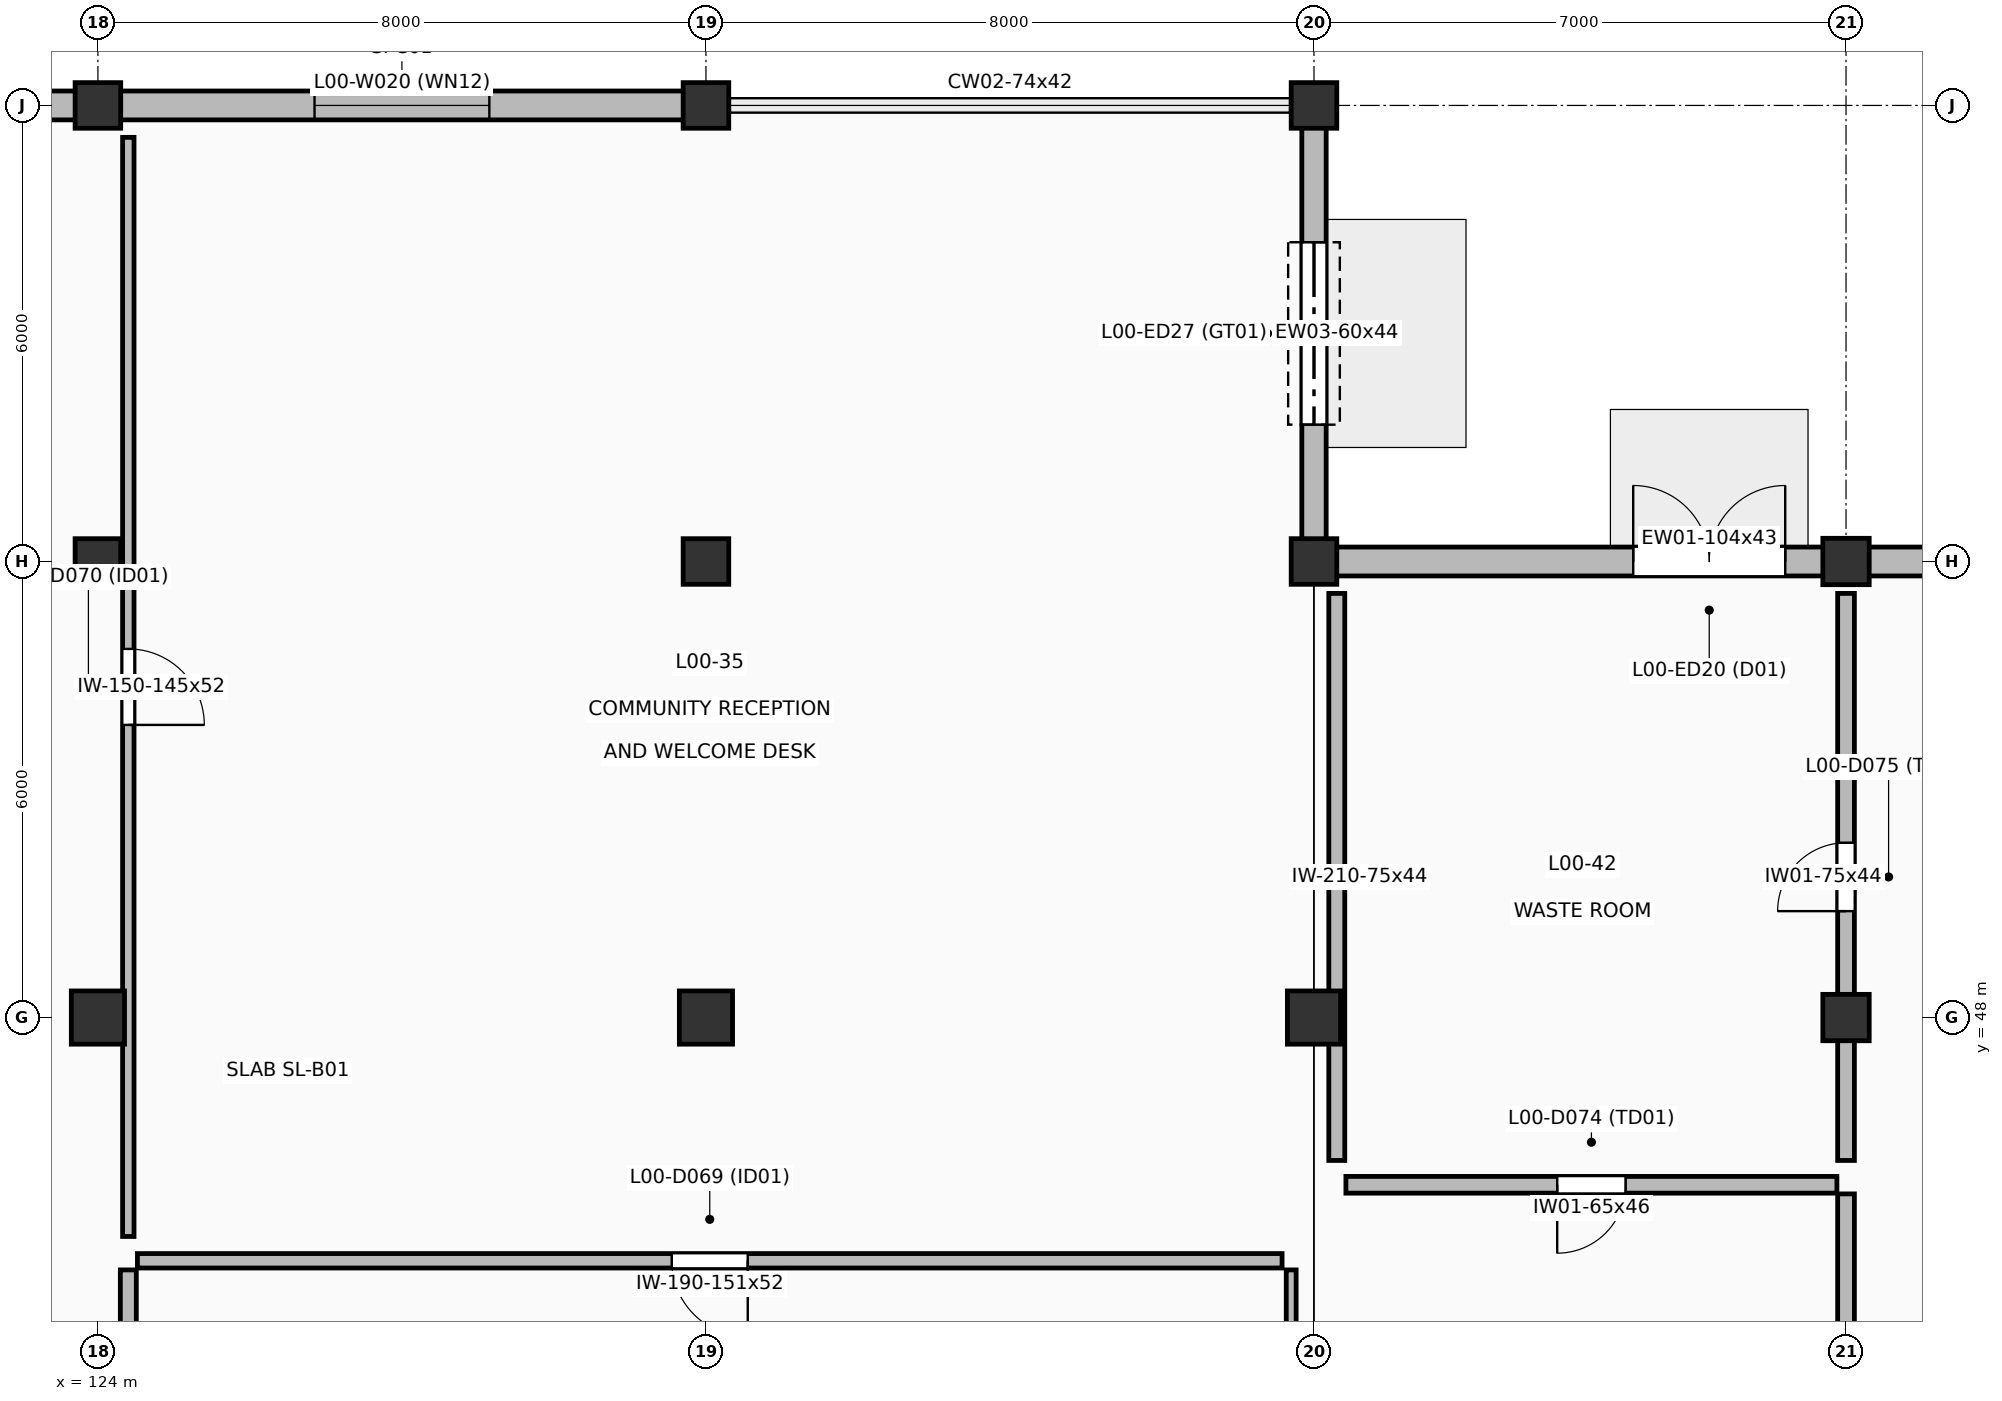
"""IFC4 building model, lengths in metres.
Left out: names, types, materials, properties, quantities, classifications, styles, units other than length and angle.
Written with IfcOpenShell. Run it as: python <this file> out.ifc"""

import sys

from ifc_helpers import new_model, si_unit, direction, frame, frame_2d, origin, origin_2d, place, context, subcontext, project, spatial, rectangle, extrude, element, fill, save


model = new_model("IFC4")
c1 = context("Model", 3, precision=1e-05, world=origin(), true_north=direction((0.0, 1.0)))
c2 = subcontext(c1, "Body", "Model", "MODEL_VIEW")
j1 = project(units=[si_unit("LENGTHUNIT", "METRE"), si_unit("PLANEANGLEUNIT", "RADIAN")], contexts=[c1])
p1 = place(None, origin())
s1 = spatial("IfcSite", under=j1, at=p1, CompositionType="ELEMENT")
p2 = place(p1, origin())
s2 = spatial("IfcBuilding", under=s1, at=p2, CompositionType="ELEMENT")
p3 = place(p2, origin())
s3 = spatial("IfcBuildingStorey", under=s2, at=p3, CompositionType="ELEMENT", Elevation=0.0)
p4 = place(p3, frame((124.0, 48.0, 0.0), z_axis=(0.0, 0.0, 1.0), x_axis=(1.0, 0.0, 0.0)))
e1 = element("IfcColumn", 1, at=p4, inside=s3, PredefinedType="COLUMN", context=c2, shape_type="SweptSolid", body=[
    extrude(rectangle(XDim=0.7, YDim=0.7, at=origin_2d()), origin(), (0.0, 0.0, 1.0), 5.4),
])
for number, where, z_axis, x_axis in (
    (2, (124.0, 54.0, 0.0), (0.0, 0.0, 1.0), (1.0, 0.0, 0.0)),
    (3, (124.0, 60.0, 0.0), (0.0, 0.0, 1.0), (1.0, 0.0, 0.0)),
):
    element("IfcColumn", number, at=place(p3, frame(where, z_axis=z_axis, x_axis=x_axis)), inside=s3, PredefinedType="COLUMN", context=c2, shape_type="SweptSolid", body=[
        extrude(rectangle(XDim=0.6, YDim=0.6, at=origin_2d()), origin(), (0.0, 0.0, 1.0), 5.4),
    ])
p5 = place(p3, frame((132.0, 48.0, 0.0), z_axis=(0.0, 0.0, 1.0), x_axis=(1.0, 0.0, 0.0)))
e4 = element("IfcColumn", 4, at=p5, inside=s3, PredefinedType="COLUMN", context=c2, shape_type="SweptSolid", body=[
    extrude(rectangle(XDim=0.7, YDim=0.7, at=origin_2d()), origin(), (0.0, 0.0, 1.0), 5.4),
])
for number, where, z_axis, x_axis in (
    (5, (132.0, 54.0, 0.0), (0.0, 0.0, 1.0), (1.0, 0.0, 0.0)),
    (6, (132.0, 60.0, 0.0), (0.0, 0.0, 1.0), (1.0, 0.0, 0.0)),
):
    element("IfcColumn", number, at=place(p3, frame(where, z_axis=z_axis, x_axis=x_axis)), inside=s3, PredefinedType="COLUMN", context=c2, shape_type="SweptSolid", body=[
        extrude(rectangle(XDim=0.6, YDim=0.6, at=origin_2d()), origin(), (0.0, 0.0, 1.0), 5.4),
    ])
p6 = place(p3, frame((140.0, 48.0, 0.0), z_axis=(0.0, 0.0, 1.0), x_axis=(1.0, 0.0, 0.0)))
e7 = element("IfcColumn", 7, at=p6, inside=s3, PredefinedType="COLUMN", context=c2, shape_type="SweptSolid", body=[
    extrude(rectangle(XDim=0.7, YDim=0.7, at=origin_2d()), origin(), (0.0, 0.0, 1.0), 5.4),
])
for number, where, z_axis, x_axis in (
    (8, (140.0, 54.0, 0.0), (0.0, 0.0, 1.0), (1.0, 0.0, 0.0)),
    (9, (140.0, 60.0, 0.0), (0.0, 0.0, 1.0), (1.0, 0.0, 0.0)),
):
    element("IfcColumn", number, at=place(p3, frame(where, z_axis=z_axis, x_axis=x_axis)), inside=s3, PredefinedType="COLUMN", context=c2, shape_type="SweptSolid", body=[
        extrude(rectangle(XDim=0.6, YDim=0.6, at=origin_2d()), origin(), (0.0, 0.0, 1.0), 5.4),
    ])
for number, where, z_axis, x_axis in (
    (10, (147.0, 48.0, 0.0), (0.0, 0.0, 1.0), (1.0, 0.0, 0.0)),
    (11, (147.0, 54.0, 0.0), (0.0, 0.0, 1.0), (1.0, 0.0, 0.0)),
):
    element("IfcColumn", number, at=place(p3, frame(where, z_axis=z_axis, x_axis=x_axis)), inside=s3, PredefinedType="COLUMN", context=c2, shape_type="SweptSolid", body=[
        extrude(rectangle(XDim=0.61, YDim=0.61, at=origin_2d()), origin(), (0.0, 0.0, 1.0), 5.4),
    ])
p7 = place(p3, frame((116.0, 60.0, 0.0), z_axis=(0.0, 0.0, 1.0), x_axis=(1.0, 0.0, 0.0)))
e12 = element("IfcWall", 12, at=p7, inside=s3, PredefinedType="SOLIDWALL", context=c2, shape_type="SweptSolid", body=[
    extrude(rectangle(XDim=8.0, YDim=0.38, at=frame_2d((4.0, 0.0))), origin(), (0.0, 0.0, 1.0), 4.245),
])
p8 = place(p7, frame((2.9, 0.0, 0.0)))
e13 = element("IfcOpeningElement", 13, at=p8, cuts=e12, PredefinedType="OPENING", context=c2, shape_type="SweptSolid", body=[
    extrude(rectangle(XDim=2.2, YDim=2.45, at=frame_2d((1.1, 1.225))), frame((0.0, 0.2, 0.0), z_axis=(0.0, -1.0, 0.0), x_axis=(1.0, 0.0, 0.0)), (0.0, 0.0, 1.0), 0.4),
])
p9 = place(p3, frame((124.0, 60.0, 0.0), z_axis=(0.0, 0.0, 1.0), x_axis=(1.0, 0.0, 0.0)))
e14 = element("IfcWall", 14, at=p9, inside=s3, PredefinedType="SOLIDWALL", context=c2, shape_type="SweptSolid", body=[
    extrude(rectangle(XDim=8.0, YDim=0.38, at=frame_2d((4.0, 0.0))), origin(), (0.0, 0.0, 1.0), 4.245),
])
p10 = place(p9, frame((2.85, 0.0, 0.9)))
e15 = element("IfcOpeningElement", 15, at=p10, cuts=e14, PredefinedType="OPENING", context=c2, shape_type="SweptSolid", body=[
    extrude(rectangle(XDim=2.3, YDim=2.6, at=frame_2d((1.15, 1.3))), frame((0.0, 0.2, 0.0), z_axis=(0.0, -1.0, 0.0), x_axis=(1.0, 0.0, 0.0)), (0.0, 0.0, 1.0), 0.4),
])
p11 = place(p3, frame((140.0, 54.0, 0.0), z_axis=(0.0, 0.0, 1.0), x_axis=(1.0, 0.0, 0.0)))
e16 = element("IfcWall", 16, at=p11, inside=s3, PredefinedType="SOLIDWALL", context=c2, shape_type="SweptSolid", body=[
    extrude(rectangle(XDim=10.4, YDim=0.38, at=frame_2d((5.2, 0.0))), origin(), (0.0, 0.0, 1.0), 4.315),
])
p12 = place(p11, frame((4.2, 0.0, 0.0)))
e17 = element("IfcOpeningElement", 17, at=p12, cuts=e16, PredefinedType="OPENING", context=c2, shape_type="SweptSolid", body=[
    extrude(rectangle(XDim=2.0, YDim=2.4, at=frame_2d((1.0, 1.2))), frame((0.0, 0.2, 0.0), z_axis=(0.0, -1.0, 0.0), x_axis=(1.0, 0.0, 0.0)), (0.0, 0.0, 1.0), 0.4),
])
p13 = place(p3, frame((140.0, 60.0, 0.0), z_axis=(0.0, 0.0, 1.0), x_axis=(0.0, -1.0, 0.0)))
e18 = element("IfcWall", 18, at=p13, inside=s3, PredefinedType="SOLIDWALL", context=c2, shape_type="SweptSolid", body=[
    extrude(rectangle(XDim=6.0, YDim=0.32, at=frame_2d((3.0, 0.0))), origin(), (0.0, 0.0, 1.0), 4.425),
])
p14 = place(p13, frame((1.8, 0.0, 0.0)))
e19 = element("IfcOpeningElement", 19, at=p14, cuts=e18, PredefinedType="OPENING", context=c2, shape_type="SweptSolid", body=[
    extrude(rectangle(XDim=2.4, YDim=2.4, at=frame_2d((1.2, 1.2))), frame((0.0, 0.17, 0.0), z_axis=(0.0, -1.0, 0.0), x_axis=(1.0, 0.0, 0.0)), (0.0, 0.0, 1.0), 0.34),
])
p15 = place(p3, frame((139.58, 44.8, 0.0), z_axis=(0.0, 0.0, 1.0), x_axis=(-1.0, 0.0, 0.0)))
e20 = element("IfcWall", 20, at=p15, inside=s3, PredefinedType="PARTITIONING", context=c2, shape_type="SweptSolid", body=[
    extrude(rectangle(XDim=15.06, YDim=0.19, at=frame_2d((7.53, 0.0))), origin(), (0.0, 0.0, 1.0), 5.16),
])
p16 = place(p15, frame((7.03, 0.0, 0.0)))
e21 = element("IfcOpeningElement", 21, at=p16, cuts=e20, PredefinedType="OPENING", context=c2, shape_type="SweptSolid", body=[
    extrude(rectangle(XDim=1.0, YDim=2.15, at=frame_2d((0.5, 1.075))), frame((0.0, 0.105, 0.0), z_axis=(0.0, -1.0, 0.0), x_axis=(1.0, 0.0, 0.0)), (0.0, 0.0, 1.0), 0.21),
])
p17 = place(p3, frame((124.4, 44.68, 0.0), z_axis=(0.0, 0.0, 1.0), x_axis=(0.0, -1.0, 0.0)))
e22 = element("IfcWall", 22, at=p17, inside=s3, PredefinedType="PARTITIONING", context=c2, shape_type="SweptSolid", body=[
    extrude(rectangle(XDim=14.26, YDim=0.21, at=frame_2d((7.13, 0.0))), origin(), (0.0, 0.0, 1.0), 5.16),
])
p18 = place(p3, frame((139.7, 30.42, 0.0), z_axis=(0.0, 0.0, 1.0), x_axis=(0.0, 1.0, 0.0)))
e23 = element("IfcWall", 23, at=p18, inside=s3, PredefinedType="PARTITIONING", context=c2, shape_type="SweptSolid", body=[
    extrude(rectangle(XDim=14.26, YDim=0.13, at=frame_2d((7.13, 0.0))), origin(), (0.0, 0.0, 1.0), 4.425),
])
p19 = place(p3, frame((124.4, 59.58, 0.0), z_axis=(0.0, 0.0, 1.0), x_axis=(0.0, -1.0, 0.0)))
e24 = element("IfcWall", 24, at=p19, inside=s3, PredefinedType="PARTITIONING", context=c2, shape_type="SweptSolid", body=[
    extrude(rectangle(XDim=14.46, YDim=0.15, at=frame_2d((7.23, 0.0))), origin(), (0.0, 0.0, 1.0), 5.16),
])
p20 = place(p19, frame((6.73, 0.0, 0.0)))
e25 = element("IfcOpeningElement", 25, at=p20, cuts=e24, PredefinedType="OPENING", context=c2, shape_type="SweptSolid", body=[
    extrude(rectangle(XDim=1.0, YDim=2.15, at=frame_2d((0.5, 1.075))), frame((0.0, 0.085, 0.0), z_axis=(0.0, -1.0, 0.0), x_axis=(1.0, 0.0, 0.0)), (0.0, 0.0, 1.0), 0.17),
])
p21 = place(p3, frame((146.88, 45.8, 0.0), z_axis=(0.0, 0.0, 1.0), x_axis=(-1.0, 0.0, 0.0)))
e26 = element("IfcWall", 26, at=p21, inside=s3, PredefinedType="SOLIDWALL", context=c2, shape_type="SweptSolid", body=[
    extrude(rectangle(XDim=6.46, YDim=0.22, at=frame_2d((3.23, 0.0))), origin(), (0.0, 0.0, 1.0), 4.585),
])
p22 = place(p21, frame((2.78, 0.0, 0.0)))
e27 = element("IfcOpeningElement", 27, at=p22, cuts=e26, PredefinedType="OPENING", context=c2, shape_type="SweptSolid", body=[
    extrude(rectangle(XDim=0.9, YDim=2.1, at=frame_2d((0.45, 1.05))), frame((0.0, 0.12, 0.0), z_axis=(0.0, -1.0, 0.0), x_axis=(1.0, 0.0, 0.0)), (0.0, 0.0, 1.0), 0.24),
])
p23 = place(p3, frame((147.0, 36.32, 0.0), z_axis=(0.0, 0.0, 1.0), x_axis=(0.0, 1.0, 0.0)))
e28 = element("IfcWall", 28, at=p23, inside=s3, PredefinedType="SOLIDWALL", context=c2, shape_type="SweptSolid", body=[
    extrude(rectangle(XDim=9.36, YDim=0.22, at=frame_2d((4.68, 0.0))), origin(), (0.0, 0.0, 1.0), 4.425),
])
p24 = place(p3, frame((147.0, 46.12, 0.0), z_axis=(0.0, 0.0, 1.0), x_axis=(0.0, 1.0, 0.0)))
e29 = element("IfcWall", 29, at=p24, inside=s3, PredefinedType="SOLIDWALL", context=c2, shape_type="SweptSolid", body=[
    extrude(rectangle(XDim=7.46, YDim=0.22, at=frame_2d((3.73, 0.0))), origin(), (0.0, 0.0, 1.0), 4.425),
])
p25 = place(p24, frame((3.28, 0.0, 0.0)))
e30 = element("IfcOpeningElement", 30, at=p25, cuts=e29, PredefinedType="OPENING", context=c2, shape_type="SweptSolid", body=[
    extrude(rectangle(XDim=0.9, YDim=2.1, at=frame_2d((0.45, 1.05))), frame((0.0, 0.12, 0.0), z_axis=(0.0, -1.0, 0.0), x_axis=(1.0, 0.0, 0.0)), (0.0, 0.0, 1.0), 0.24),
])
p26 = place(p3, frame((140.3, 53.58, 0.0), z_axis=(0.0, 0.0, 1.0), x_axis=(0.0, -1.0, 0.0)))
e31 = element("IfcWall", 31, at=p26, inside=s3, PredefinedType="PARTITIONING", context=c2, shape_type="SweptSolid", body=[
    extrude(rectangle(XDim=7.46, YDim=0.21, at=frame_2d((3.73, 0.0))), origin(), (0.0, 0.0, 1.0), 4.425),
])
p27 = place(p10, origin())
e32 = element("IfcWindow", 32, at=p27, inside=s3, PartitioningType="DOUBLE_PANEL_VERTICAL", PredefinedType="WINDOW", context=c2, shape_type="SweptSolid", body=[
    extrude(rectangle(XDim=2.3, YDim=2.6, at=frame_2d((1.15, 1.3))), frame((0.0, 0.03, 0.0), z_axis=(0.0, -1.0, 0.0), x_axis=(1.0, 0.0, 0.0)), (0.0, 0.0, 1.0), 0.06),
])
fill(e15, e32)
p28 = place(p12, origin())
e33 = element("IfcDoor", 33, at=p28, inside=s3, OperationType="DOUBLE_DOOR_SINGLE_SWING", PredefinedType="DOOR", context=c2, shape_type="SweptSolid", body=[
    extrude(rectangle(XDim=2.0, YDim=2.4, at=frame_2d((1.0, 1.2))), frame((0.0, 0.025, 0.0), z_axis=(0.0, -1.0, 0.0), x_axis=(1.0, 0.0, 0.0)), (0.0, 0.0, 1.0), 0.05),
])
fill(e17, e33)
p29 = place(p14, origin())
e34 = element("IfcDoor", 34, at=p29, inside=s3, OperationType="DOUBLE_DOOR_SINGLE_SWING", PredefinedType="GATE", context=c2, shape_type="SweptSolid", body=[
    extrude(rectangle(XDim=2.4, YDim=2.4, at=frame_2d((1.2, 1.2))), frame((0.0, 0.025, 0.0), z_axis=(0.0, -1.0, 0.0), x_axis=(1.0, 0.0, 0.0)), (0.0, 0.0, 1.0), 0.05),
])
fill(e19, e34)
p30 = place(p16, origin())
e35 = element("IfcDoor", 35, at=p30, inside=s3, OperationType="SINGLE_SWING_LEFT", PredefinedType="DOOR", context=c2, shape_type="SweptSolid", body=[
    extrude(rectangle(XDim=1.0, YDim=2.15, at=frame_2d((0.5, 1.075))), frame((0.0, 0.025, 0.0), z_axis=(0.0, -1.0, 0.0), x_axis=(1.0, 0.0, 0.0)), (0.0, 0.0, 1.0), 0.05),
])
fill(e21, e35)
p31 = place(p20, origin())
e36 = element("IfcDoor", 36, at=p31, inside=s3, OperationType="SINGLE_SWING_RIGHT", PredefinedType="DOOR", context=c2, shape_type="SweptSolid", body=[
    extrude(rectangle(XDim=1.0, YDim=2.15, at=frame_2d((0.5, 1.075))), frame((0.0, 0.025, 0.0), z_axis=(0.0, -1.0, 0.0), x_axis=(1.0, 0.0, 0.0)), (0.0, 0.0, 1.0), 0.05),
])
fill(e25, e36)
p32 = place(p22, origin())
e37 = element("IfcDoor", 37, at=p32, inside=s3, OperationType="SINGLE_SWING_RIGHT", PredefinedType="TRAPDOOR", context=c2, shape_type="SweptSolid", body=[
    extrude(rectangle(XDim=0.9, YDim=2.1, at=frame_2d((0.45, 1.05))), frame((0.0, 0.025, 0.0), z_axis=(0.0, -1.0, 0.0), x_axis=(1.0, 0.0, 0.0)), (0.0, 0.0, 1.0), 0.05),
])
fill(e27, e37)
p33 = place(p25, origin())
e38 = element("IfcDoor", 38, at=p33, inside=s3, OperationType="SINGLE_SWING_LEFT", PredefinedType="TRAPDOOR", context=c2, shape_type="SweptSolid", body=[
    extrude(rectangle(XDim=0.9, YDim=2.1, at=frame_2d((0.45, 1.05))), frame((0.0, 0.025, 0.0), z_axis=(0.0, -1.0, 0.0), x_axis=(1.0, 0.0, 0.0)), (0.0, 0.0, 1.0), 0.05),
])
fill(e30, e38)
save(model, sys.argv[1])
